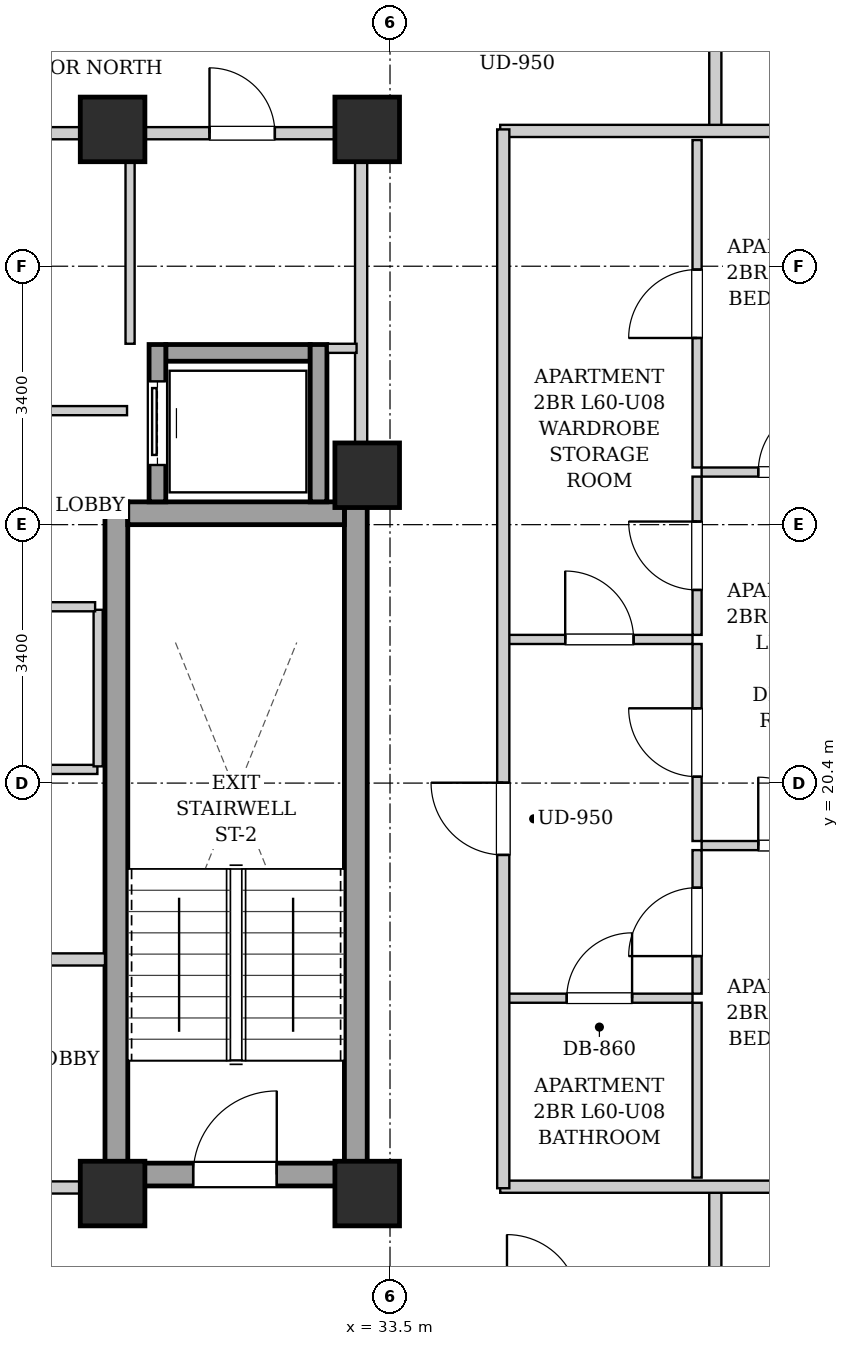
"""IFC4 building model, lengths in metres.
Left out: names, types, materials, properties, quantities, classifications, styles, units other than length and angle.
Written with IfcOpenShell. Run it as: python <this file> out.ifc"""

import sys

from ifc_helpers import new_model, si_unit, direction, frame, frame_2d, origin, origin_2d, place, context, subcontext, project, spatial, rectangle, extrude, element, fill, save


model = new_model("IFC4")
c1 = context("Model", 3, precision=1e-05, world=origin(), true_north=direction((0.0, 1.0)))
c2 = subcontext(c1, "Body", "Model", "MODEL_VIEW")
j1 = project(units=[si_unit("LENGTHUNIT", "METRE"), si_unit("PLANEANGLEUNIT", "RADIAN")], contexts=[c1])
p1 = place(None, origin())
s1 = spatial("IfcSite", under=j1, at=p1, CompositionType="ELEMENT")
p2 = place(p1, origin())
s2 = spatial("IfcBuilding", under=s1, at=p2, CompositionType="ELEMENT")
p3 = place(p2, frame((0.0, 0.0, 207.4)))
s3 = spatial("IfcBuildingStorey", under=s2, at=p3, CompositionType="ELEMENT", Elevation=207.4)
for number, where, z_axis, x_axis in (
    (1, (29.85, 15.0, 0.0), (0.0, 0.0, 1.0), (1.0, 0.0, 0.0)),
    (2, (33.2, 15.0, 0.0), (0.0, 0.0, 1.0), (1.0, 0.0, 0.0)),
    (3, (29.85, 29.0, 0.0), (0.0, 0.0, 1.0), (1.0, 0.0, 0.0)),
    (4, (33.2, 29.0, 0.0), (0.0, 0.0, 1.0), (1.0, 0.0, 0.0)),
    (5, (33.2, 24.45, 0.0), (0.0, 0.0, 1.0), (1.0, 0.0, 0.0)),
):
    element("IfcColumn", number, at=place(p3, frame(where, z_axis=z_axis, x_axis=x_axis)), inside=s3, PredefinedType="COLUMN", context=c2, shape_type="SweptSolid", body=[
        extrude(rectangle(XDim=0.85, YDim=0.85, at=origin_2d()), origin(), (0.0, 0.0, 1.0), 3.3),
    ])
for number, where, z_axis, x_axis in (
    (6, (29.9, 15.1, 0.0), (0.0, 0.0, 1.0), (0.0, 1.0, 0.0)),
    (7, (33.05, 15.1, 0.0), (0.0, 0.0, 1.0), (0.0, 1.0, 0.0)),
):
    element("IfcWall", number, at=place(p3, frame(where, z_axis=z_axis, x_axis=x_axis)), inside=s3, PredefinedType="SHEAR", context=c2, shape_type="SweptSolid", body=[
        extrude(rectangle(XDim=9.0, YDim=0.3, at=frame_2d((4.5, 0.0))), origin(), (0.0, 0.0, 1.0), 3.04),
    ])
p4 = place(p3, frame((30.05, 23.95, 0.0), z_axis=(0.0, 0.0, 1.0), x_axis=(1.0, 0.0, 0.0)))
e8 = element("IfcWall", 8, at=p4, inside=s3, PredefinedType="SHEAR", context=c2, shape_type="SweptSolid", body=[
    extrude(rectangle(XDim=2.85, YDim=0.3, at=frame_2d((1.425, 0.0))), origin(), (0.0, 0.0, 1.0), 3.04),
])
p5 = place(p3, frame((30.05, 15.25, 0.0), z_axis=(0.0, 0.0, 1.0), x_axis=(1.0, 0.0, 0.0)))
e9 = element("IfcWall", 9, at=p5, inside=s3, PredefinedType="SHEAR", context=c2, shape_type="SweptSolid", body=[
    extrude(rectangle(XDim=2.85, YDim=0.3, at=frame_2d((1.425, 0.0))), origin(), (0.0, 0.0, 1.0), 3.04),
])
p6 = place(p5, frame((0.86, 0.0, 0.0)))
e10 = element("IfcOpeningElement", 10, at=p6, cuts=e9, PredefinedType="OPENING", context=c2, shape_type="SweptSolid", body=[
    extrude(rectangle(XDim=1.1, YDim=2.05, at=frame_2d((0.55, 1.025))), frame((0.0, 0.16, 0.0), z_axis=(0.0, -1.0, 0.0), x_axis=(1.0, 0.0, 0.0)), (0.0, 0.0, 1.0), 0.32),
])
p7 = place(p3, frame((30.55, 26.06, 0.0), z_axis=(0.0, 0.0, 1.0), x_axis=(1.0, 0.0, 0.0)))
e11 = element("IfcWall", 11, at=p7, inside=s3, PredefinedType="SHEAR", context=c2, shape_type="SweptSolid", body=[
    extrude(rectangle(XDim=1.9, YDim=0.22, at=frame_2d((0.95, 0.0))), origin(), (0.0, 0.0, 1.0), 3.04),
])
p8 = place(p3, frame((30.44, 24.1, 0.0), z_axis=(0.0, 0.0, 1.0), x_axis=(0.0, 1.0, 0.0)))
e12 = element("IfcWall", 12, at=p8, inside=s3, PredefinedType="SHEAR", context=c2, shape_type="SweptSolid", body=[
    extrude(rectangle(XDim=2.07, YDim=0.22, at=frame_2d((1.035, 0.0))), origin(), (0.0, 0.0, 1.0), 3.04),
])
p9 = place(p8, frame((0.485, 0.0, 0.0)))
e13 = element("IfcOpeningElement", 13, at=p9, cuts=e12, PredefinedType="OPENING", context=c2, shape_type="SweptSolid", body=[
    extrude(rectangle(XDim=1.1, YDim=2.15, at=frame_2d((0.55, 1.075))), frame((0.0, 0.12, 0.0), z_axis=(0.0, -1.0, 0.0), x_axis=(1.0, 0.0, 0.0)), (0.0, 0.0, 1.0), 0.24),
])
p10 = place(p3, frame((32.56, 24.1, 0.0), z_axis=(0.0, 0.0, 1.0), x_axis=(0.0, 1.0, 0.0)))
e14 = element("IfcWall", 14, at=p10, inside=s3, PredefinedType="SHEAR", context=c2, shape_type="SweptSolid", body=[
    extrude(rectangle(XDim=2.07, YDim=0.22, at=frame_2d((1.035, 0.0))), origin(), (0.0, 0.0, 1.0), 3.04),
])
p11 = place(p3, frame((21.25, 15.08, 0.0), z_axis=(0.0, 0.0, 1.0), x_axis=(1.0, 0.0, 0.0)))
e15 = element("IfcWall", 15, at=p11, inside=s3, PredefinedType="PARTITIONING", context=c2, shape_type="SweptSolid", body=[
    extrude(rectangle(XDim=8.5, YDim=0.16, at=frame_2d((4.25, 0.0))), origin(), (0.0, 0.0, 1.0), 2.556),
])
p12 = place(p11, frame((3.725, 0.0, 0.0)))
e16 = element("IfcOpeningElement", 16, at=p12, cuts=e15, PredefinedType="OPENING", context=c2, shape_type="SweptSolid", body=[
    extrude(rectangle(XDim=1.05, YDim=2.05, at=frame_2d((0.525, 1.025))), frame((0.0, 0.09, 0.0), z_axis=(0.0, -1.0, 0.0), x_axis=(1.0, 0.0, 0.0)), (0.0, 0.0, 1.0), 0.18),
])
p13 = place(p3, frame((28.65, 18.08, 0.0), z_axis=(0.0, 0.0, 1.0), x_axis=(1.0, 0.0, 0.0)))
e17 = element("IfcWall", 17, at=p13, inside=s3, PredefinedType="PARTITIONING", context=c2, shape_type="SweptSolid", body=[
    extrude(rectangle(XDim=1.1, YDim=0.16, at=frame_2d((0.55, 0.0))), origin(), (0.0, 0.0, 1.0), 3.04),
])
p14 = place(p3, frame((33.12, 24.12, 0.0), z_axis=(0.0, 0.0, 1.0), x_axis=(0.0, 1.0, 0.0)))
e18 = element("IfcWall", 18, at=p14, inside=s3, PredefinedType="PARTITIONING", context=c2, shape_type="SweptSolid", body=[
    extrude(rectangle(XDim=4.76, YDim=0.16, at=frame_2d((2.38, 0.0))), origin(), (0.0, 0.0, 1.0), 2.375),
])
p15 = place(p3, frame((30.08, 26.18, 0.0), z_axis=(0.0, 0.0, 1.0), x_axis=(0.0, 1.0, 0.0)))
e19 = element("IfcWall", 19, at=p15, inside=s3, PredefinedType="PARTITIONING", context=c2, shape_type="SweptSolid", body=[
    extrude(rectangle(XDim=2.68, YDim=0.12, at=frame_2d((1.34, 0.0))), origin(), (0.0, 0.0, 1.0), 3.04),
])
p16 = place(p3, frame((32.68, 26.12, 0.0), z_axis=(0.0, 0.0, 1.0), x_axis=(1.0, 0.0, 0.0)))
e20 = element("IfcWall", 20, at=p16, inside=s3, PredefinedType="PARTITIONING", context=c2, shape_type="SweptSolid", body=[
    extrude(rectangle(XDim=0.38, YDim=0.12, at=frame_2d((0.19, 0.0))), origin(), (0.0, 0.0, 1.0), 3.04),
])
p17 = place(p3, frame((30.08, 28.95, 0.0), z_axis=(0.0, 0.0, 1.0), x_axis=(1.0, 0.0, 0.0)))
e21 = element("IfcWall", 21, at=p17, inside=s3, PredefinedType="PARTITIONING", context=c2, shape_type="SweptSolid", body=[
    extrude(rectangle(XDim=2.96, YDim=0.16, at=frame_2d((1.48, 0.0))), origin(), (0.0, 0.0, 1.0), 3.04),
])
p18 = place(p17, frame((1.045, 0.0, 0.0)))
e22 = element("IfcOpeningElement", 22, at=p18, cuts=e21, PredefinedType="OPENING", context=c2, shape_type="SweptSolid", body=[
    extrude(rectangle(XDim=0.86, YDim=2.05, at=frame_2d((0.43, 1.025))), frame((0.0, 0.09, 0.0), z_axis=(0.0, -1.0, 0.0), x_axis=(1.0, 0.0, 0.0)), (0.0, 0.0, 1.0), 0.18),
])
p19 = place(p3, frame((25.72, 28.95, 0.0), z_axis=(0.0, 0.0, 1.0), x_axis=(1.0, 0.0, 0.0)))
e23 = element("IfcWall", 23, at=p19, inside=s3, PredefinedType="PARTITIONING", context=c2, shape_type="SweptSolid", body=[
    extrude(rectangle(XDim=4.32, YDim=0.16, at=frame_2d((2.16, 0.0))), origin(), (0.0, 0.0, 1.0), 2.556),
])
p20 = place(p3, frame((25.72, 25.3, 0.0), z_axis=(0.0, 0.0, 1.0), x_axis=(1.0, 0.0, 0.0)))
e24 = element("IfcWall", 24, at=p20, inside=s3, PredefinedType="PARTITIONING", context=c2, shape_type="SweptSolid", body=[
    extrude(rectangle(XDim=4.32, YDim=0.12, at=frame_2d((2.16, 0.0))), origin(), (0.0, 0.0, 1.0), 3.04),
])
p21 = place(p20, frame((1.65, 0.0, 0.0)))
e25 = element("IfcOpeningElement", 25, at=p21, cuts=e24, PredefinedType="OPENING", context=c2, shape_type="SweptSolid", body=[
    extrude(rectangle(XDim=0.9, YDim=2.05, at=frame_2d((0.45, 1.025))), frame((0.0, 0.07, 0.0), z_axis=(0.0, -1.0, 0.0), x_axis=(1.0, 0.0, 0.0)), (0.0, 0.0, 1.0), 0.14),
])
p22 = place(p3, frame((22.3, 20.58, 0.0), z_axis=(0.0, 0.0, 1.0), x_axis=(1.0, 0.0, 0.0)))
e26 = element("IfcWall", 26, at=p22, inside=s3, PredefinedType="PARTITIONING", context=c2, shape_type="SweptSolid", body=[
    extrude(rectangle(XDim=7.35, YDim=0.12, at=frame_2d((3.675, 0.0))), origin(), (0.0, 0.0, 1.0), 3.04),
])
p23 = place(p3, frame((29.66, 20.62, 0.0), z_axis=(0.0, 0.0, 1.0), x_axis=(0.0, 1.0, 0.0)))
e27 = element("IfcWall", 27, at=p23, inside=s3, PredefinedType="PARTITIONING", context=c2, shape_type="SweptSolid", body=[
    extrude(rectangle(XDim=2.06, YDim=0.12, at=frame_2d((1.03, 0.0))), origin(), (0.0, 0.0, 1.0), 3.04),
])
p24 = place(p3, frame((22.35, 22.72, 0.0), z_axis=(0.0, 0.0, 1.0), x_axis=(1.0, 0.0, 0.0)))
e28 = element("IfcWall", 28, at=p24, inside=s3, PredefinedType="PARTITIONING", context=c2, shape_type="SweptSolid", body=[
    extrude(rectangle(XDim=7.27, YDim=0.12, at=frame_2d((3.635, 0.0))), origin(), (0.0, 0.0, 1.0), 3.04),
])
p25 = place(p24, frame((3.25, 0.0, 0.0)))
e29 = element("IfcOpeningElement", 29, at=p25, cuts=e28, PredefinedType="OPENING", context=c2, shape_type="SweptSolid", body=[
    extrude(rectangle(XDim=0.9, YDim=2.05, at=frame_2d((0.45, 1.025))), frame((0.0, 0.07, 0.0), z_axis=(0.0, -1.0, 0.0), x_axis=(1.0, 0.0, 0.0)), (0.0, 0.0, 1.0), 0.14),
])
for number, where, z_axis, x_axis in (
    (30, (37.78, 13.51, 0.0), (0.0, 0.0, 1.0), (0.0, 1.0, 0.0)),
    (31, (37.78, 28.98, 0.0), (0.0, 0.0, 1.0), (0.0, 1.0, 0.0)),
):
    element("IfcWall", number, at=place(p3, frame(where, z_axis=z_axis, x_axis=x_axis)), inside=s3, PredefinedType="PARTITIONING", context=c2, shape_type="SweptSolid", body=[
        extrude(rectangle(XDim=1.58, YDim=0.16, at=frame_2d((0.79, 0.0))), origin(), (0.0, 0.0, 1.0), 3.04),
    ])
for number, where, z_axis, x_axis in (
    (32, (34.95, 15.09, 0.0), (0.0, 0.0, 1.0), (1.0, 0.0, 0.0)),
    (33, (34.95, 28.98, 0.0), (0.0, 0.0, 1.0), (1.0, 0.0, 0.0)),
):
    element("IfcWall", number, at=place(p3, frame(where, z_axis=z_axis, x_axis=x_axis)), inside=s3, PredefinedType="PARTITIONING", context=c2, shape_type="SweptSolid", body=[
        extrude(rectangle(XDim=5.07, YDim=0.16, at=frame_2d((2.535, 0.0))), origin(), (0.0, 0.0, 1.0), 2.556),
    ])
p26 = place(p3, frame((35.03, 22.29, 0.0), z_axis=(0.0, 0.0, 1.0), x_axis=(1.0, 0.0, 0.0)))
e34 = element("IfcWall", 34, at=p26, inside=s3, PredefinedType="PARTITIONING", context=c2, shape_type="SweptSolid", body=[
    extrude(rectangle(XDim=2.45, YDim=0.12, at=frame_2d((1.225, 0.0))), origin(), (0.0, 0.0, 1.0), 3.04),
])
p27 = place(p26, frame((0.775, 0.0, 0.0)))
e35 = element("IfcOpeningElement", 35, at=p27, cuts=e34, PredefinedType="OPENING", context=c2, shape_type="SweptSolid", body=[
    extrude(rectangle(XDim=0.9, YDim=2.05, at=frame_2d((0.45, 1.025))), frame((0.0, 0.07, 0.0), z_axis=(0.0, -1.0, 0.0), x_axis=(1.0, 0.0, 0.0)), (0.0, 0.0, 1.0), 0.14),
])
p28 = place(p3, frame((37.54, 22.35, 0.0), z_axis=(0.0, 0.0, 1.0), x_axis=(0.0, 1.0, 0.0)))
e36 = element("IfcWall", 36, at=p28, inside=s3, PredefinedType="PARTITIONING", context=c2, shape_type="SweptSolid", body=[
    extrude(rectangle(XDim=2.082, YDim=0.12, at=frame_2d((1.041, 0.0))), origin(), (0.0, 0.0, 1.0), 3.04),
])
p29 = place(p28, frame((0.591, 0.0, 0.0)))
e37 = element("IfcOpeningElement", 37, at=p29, cuts=e36, PredefinedType="OPENING", context=c2, shape_type="SweptSolid", body=[
    extrude(rectangle(XDim=0.9, YDim=2.05, at=frame_2d((0.45, 1.025))), frame((0.0, 0.07, 0.0), z_axis=(0.0, -1.0, 0.0), x_axis=(1.0, 0.0, 0.0)), (0.0, 0.0, 1.0), 0.14),
])
p30 = place(p3, frame((37.54, 24.552, 0.0), z_axis=(0.0, 0.0, 1.0), x_axis=(0.0, 1.0, 0.0)))
e38 = element("IfcWall", 38, at=p30, inside=s3, PredefinedType="PARTITIONING", context=c2, shape_type="SweptSolid", body=[
    extrude(rectangle(XDim=4.308, YDim=0.12, at=frame_2d((2.154, 0.0))), origin(), (0.0, 0.0, 1.0), 3.04),
])
p31 = place(p30, frame((1.704, 0.0, 0.0)))
e39 = element("IfcOpeningElement", 39, at=p31, cuts=e38, PredefinedType="OPENING", context=c2, shape_type="SweptSolid", body=[
    extrude(rectangle(XDim=0.9, YDim=2.05, at=frame_2d((0.45, 1.025))), frame((0.0, 0.07, 0.0), z_axis=(0.0, -1.0, 0.0), x_axis=(1.0, 0.0, 0.0)), (0.0, 0.0, 1.0), 0.14),
])
p32 = place(p3, frame((35.03, 17.57, 0.0), z_axis=(0.0, 0.0, 1.0), x_axis=(1.0, 0.0, 0.0)))
e40 = element("IfcWall", 40, at=p32, inside=s3, PredefinedType="PARTITIONING", context=c2, shape_type="SweptSolid", body=[
    extrude(rectangle(XDim=2.45, YDim=0.12, at=frame_2d((1.225, 0.0))), origin(), (0.0, 0.0, 1.0), 3.04),
])
p33 = place(p32, frame((0.795, 0.0, 0.0)))
e41 = element("IfcOpeningElement", 41, at=p33, cuts=e40, PredefinedType="OPENING", context=c2, shape_type="SweptSolid", body=[
    extrude(rectangle(XDim=0.86, YDim=2.05, at=frame_2d((0.43, 1.025))), frame((0.0, 0.07, 0.0), z_axis=(0.0, -1.0, 0.0), x_axis=(1.0, 0.0, 0.0)), (0.0, 0.0, 1.0), 0.14),
])
p34 = place(p3, frame((37.54, 15.21, 0.0), z_axis=(0.0, 0.0, 1.0), x_axis=(0.0, 1.0, 0.0)))
e42 = element("IfcWall", 42, at=p34, inside=s3, PredefinedType="PARTITIONING", context=c2, shape_type="SweptSolid", body=[
    extrude(rectangle(XDim=2.3, YDim=0.12, at=frame_2d((1.15, 0.0))), origin(), (0.0, 0.0, 1.0), 3.04),
])
p35 = place(p3, frame((37.54, 17.63, 0.0), z_axis=(0.0, 0.0, 1.0), x_axis=(0.0, 1.0, 0.0)))
e43 = element("IfcWall", 43, at=p35, inside=s3, PredefinedType="PARTITIONING", context=c2, shape_type="SweptSolid", body=[
    extrude(rectangle(XDim=1.888, YDim=0.12, at=frame_2d((0.944, 0.0))), origin(), (0.0, 0.0, 1.0), 3.04),
])
p36 = place(p35, frame((0.494, 0.0, 0.0)))
e44 = element("IfcOpeningElement", 44, at=p36, cuts=e43, PredefinedType="OPENING", context=c2, shape_type="SweptSolid", body=[
    extrude(rectangle(XDim=0.9, YDim=2.05, at=frame_2d((0.45, 1.025))), frame((0.0, 0.07, 0.0), z_axis=(0.0, -1.0, 0.0), x_axis=(1.0, 0.0, 0.0)), (0.0, 0.0, 1.0), 0.14),
])
p37 = place(p3, frame((37.54, 19.638, 0.0), z_axis=(0.0, 0.0, 1.0), x_axis=(0.0, 1.0, 0.0)))
e45 = element("IfcWall", 45, at=p37, inside=s3, PredefinedType="PARTITIONING", context=c2, shape_type="SweptSolid", body=[
    extrude(rectangle(XDim=2.592, YDim=0.12, at=frame_2d((1.296, 0.0))), origin(), (0.0, 0.0, 1.0), 3.04),
])
p38 = place(p37, frame((0.846, 0.0, 0.0)))
e46 = element("IfcOpeningElement", 46, at=p38, cuts=e45, PredefinedType="OPENING", context=c2, shape_type="SweptSolid", body=[
    extrude(rectangle(XDim=0.9, YDim=2.05, at=frame_2d((0.45, 1.025))), frame((0.0, 0.07, 0.0), z_axis=(0.0, -1.0, 0.0), x_axis=(1.0, 0.0, 0.0)), (0.0, 0.0, 1.0), 0.14),
])
p39 = place(p3, frame((37.6, 19.578, 0.0), z_axis=(0.0, 0.0, 1.0), x_axis=(1.0, 0.0, 0.0)))
e47 = element("IfcWall", 47, at=p39, inside=s3, PredefinedType="PARTITIONING", context=c2, shape_type="SweptSolid", body=[
    extrude(rectangle(XDim=2.42, YDim=0.12, at=frame_2d((1.21, 0.0))), origin(), (0.0, 0.0, 1.0), 3.04),
])
p40 = place(p39, frame((0.745, 0.0, 0.0)))
e48 = element("IfcOpeningElement", 48, at=p40, cuts=e47, PredefinedType="OPENING", context=c2, shape_type="SweptSolid", body=[
    extrude(rectangle(XDim=0.9, YDim=2.05, at=frame_2d((0.45, 1.025))), frame((0.0, 0.07, 0.0), z_axis=(0.0, -1.0, 0.0), x_axis=(1.0, 0.0, 0.0)), (0.0, 0.0, 1.0), 0.14),
])
p41 = place(p3, frame((37.6, 24.492, 0.0), z_axis=(0.0, 0.0, 1.0), x_axis=(1.0, 0.0, 0.0)))
e49 = element("IfcWall", 49, at=p41, inside=s3, PredefinedType="PARTITIONING", context=c2, shape_type="SweptSolid", body=[
    extrude(rectangle(XDim=2.42, YDim=0.12, at=frame_2d((1.21, 0.0))), origin(), (0.0, 0.0, 1.0), 2.722),
])
p42 = place(p41, frame((0.745, 0.0, 0.0)))
e50 = element("IfcOpeningElement", 50, at=p42, cuts=e49, PredefinedType="OPENING", context=c2, shape_type="SweptSolid", body=[
    extrude(rectangle(XDim=0.9, YDim=2.05, at=frame_2d((0.45, 1.025))), frame((0.0, 0.07, 0.0), z_axis=(0.0, -1.0, 0.0), x_axis=(1.0, 0.0, 0.0)), (0.0, 0.0, 1.0), 0.14),
])
p43 = place(p3, frame((34.99, 15.07, 0.0), z_axis=(0.0, 0.0, 1.0), x_axis=(0.0, 1.0, 0.0)))
e51 = element("IfcWall", 51, at=p43, inside=s3, PredefinedType="PARTITIONING", context=c2, shape_type="SweptSolid", body=[
    extrude(rectangle(XDim=13.93, YDim=0.16, at=frame_2d((6.965, 0.0))), origin(), (0.0, 0.0, 1.0), 3.04),
])
p44 = place(p43, frame((4.385, 0.0, 0.0)))
e52 = element("IfcOpeningElement", 52, at=p44, cuts=e51, PredefinedType="OPENING", context=c2, shape_type="SweptSolid", body=[
    extrude(rectangle(XDim=0.95, YDim=2.1, at=frame_2d((0.475, 1.05))), frame((0.0, 0.09, 0.0), z_axis=(0.0, -1.0, 0.0), x_axis=(1.0, 0.0, 0.0)), (0.0, 0.0, 1.0), 0.18),
])
p45 = place(p6, origin())
e53 = element("IfcDoor", 53, at=p45, inside=s3, OperationType="SINGLE_SWING_RIGHT", PredefinedType="DOOR", context=c2, shape_type="SweptSolid", body=[
    extrude(rectangle(XDim=1.1, YDim=2.05, at=frame_2d((0.55, 1.025))), frame((0.0, 0.025, 0.0), z_axis=(0.0, -1.0, 0.0), x_axis=(1.0, 0.0, 0.0)), (0.0, 0.0, 1.0), 0.05),
])
fill(e10, e53)
p46 = place(p9, origin())
e54 = element("IfcDoor", 54, at=p46, inside=s3, OperationType="SLIDING_TO_LEFT", PredefinedType="DOOR", context=c2, shape_type="SweptSolid", body=[
    extrude(rectangle(XDim=1.1, YDim=2.15, at=frame_2d((0.55, 1.075))), frame((0.0, 0.025, 0.0), z_axis=(0.0, -1.0, 0.0), x_axis=(1.0, 0.0, 0.0)), (0.0, 0.0, 1.0), 0.05),
])
fill(e13, e54)
p47 = place(p18, origin())
e55 = element("IfcDoor", 55, at=p47, inside=s3, OperationType="SINGLE_SWING_LEFT", PredefinedType="DOOR", context=c2, shape_type="SweptSolid", body=[
    extrude(rectangle(XDim=0.86, YDim=2.05, at=frame_2d((0.43, 1.025))), frame((0.0, 0.025, 0.0), z_axis=(0.0, -1.0, 0.0), x_axis=(1.0, 0.0, 0.0)), (0.0, 0.0, 1.0), 0.05),
])
fill(e22, e55)
p48 = place(p27, origin())
e56 = element("IfcDoor", 56, at=p48, inside=s3, OperationType="SINGLE_SWING_LEFT", PredefinedType="DOOR", context=c2, shape_type="SweptSolid", body=[
    extrude(rectangle(XDim=0.9, YDim=2.05, at=frame_2d((0.45, 1.025))), frame((0.0, 0.025, 0.0), z_axis=(0.0, -1.0, 0.0), x_axis=(1.0, 0.0, 0.0)), (0.0, 0.0, 1.0), 0.05),
])
fill(e35, e56)
p49 = place(p29, origin())
e57 = element("IfcDoor", 57, at=p49, inside=s3, OperationType="SINGLE_SWING_RIGHT", PredefinedType="DOOR", context=c2, shape_type="SweptSolid", body=[
    extrude(rectangle(XDim=0.9, YDim=2.05, at=frame_2d((0.45, 1.025))), frame((0.0, 0.025, 0.0), z_axis=(0.0, -1.0, 0.0), x_axis=(1.0, 0.0, 0.0)), (0.0, 0.0, 1.0), 0.05),
])
fill(e37, e57)
p50 = place(p31, origin())
e58 = element("IfcDoor", 58, at=p50, inside=s3, OperationType="SINGLE_SWING_LEFT", PredefinedType="DOOR", context=c2, shape_type="SweptSolid", body=[
    extrude(rectangle(XDim=0.9, YDim=2.05, at=frame_2d((0.45, 1.025))), frame((0.0, 0.025, 0.0), z_axis=(0.0, -1.0, 0.0), x_axis=(1.0, 0.0, 0.0)), (0.0, 0.0, 1.0), 0.05),
])
fill(e39, e58)
p51 = place(p33, origin())
e59 = element("IfcDoor", 59, at=p51, inside=s3, OperationType="SINGLE_SWING_RIGHT", PredefinedType="DOOR", context=c2, shape_type="SweptSolid", body=[
    extrude(rectangle(XDim=0.86, YDim=2.05, at=frame_2d((0.43, 1.025))), frame((0.0, 0.025, 0.0), z_axis=(0.0, -1.0, 0.0), x_axis=(1.0, 0.0, 0.0)), (0.0, 0.0, 1.0), 0.05),
])
fill(e41, e59)
p52 = place(p36, origin())
e60 = element("IfcDoor", 60, at=p52, inside=s3, OperationType="SINGLE_SWING_LEFT", PredefinedType="DOOR", context=c2, shape_type="SweptSolid", body=[
    extrude(rectangle(XDim=0.9, YDim=2.05, at=frame_2d((0.45, 1.025))), frame((0.0, 0.025, 0.0), z_axis=(0.0, -1.0, 0.0), x_axis=(1.0, 0.0, 0.0)), (0.0, 0.0, 1.0), 0.05),
])
fill(e44, e60)
p53 = place(p38, origin())
e61 = element("IfcDoor", 61, at=p53, inside=s3, OperationType="SINGLE_SWING_RIGHT", PredefinedType="DOOR", context=c2, shape_type="SweptSolid", body=[
    extrude(rectangle(XDim=0.9, YDim=2.05, at=frame_2d((0.45, 1.025))), frame((0.0, 0.025, 0.0), z_axis=(0.0, -1.0, 0.0), x_axis=(1.0, 0.0, 0.0)), (0.0, 0.0, 1.0), 0.05),
])
fill(e46, e61)
p54 = place(p40, origin())
e62 = element("IfcDoor", 62, at=p54, inside=s3, OperationType="SINGLE_SWING_LEFT", PredefinedType="DOOR", context=c2, shape_type="SweptSolid", body=[
    extrude(rectangle(XDim=0.9, YDim=2.05, at=frame_2d((0.45, 1.025))), frame((0.0, 0.025, 0.0), z_axis=(0.0, -1.0, 0.0), x_axis=(1.0, 0.0, 0.0)), (0.0, 0.0, 1.0), 0.05),
])
fill(e48, e62)
p55 = place(p42, origin())
e63 = element("IfcDoor", 63, at=p55, inside=s3, OperationType="SINGLE_SWING_RIGHT", PredefinedType="DOOR", context=c2, shape_type="SweptSolid", body=[
    extrude(rectangle(XDim=0.9, YDim=2.05, at=frame_2d((0.45, 1.025))), frame((0.0, 0.025, 0.0), z_axis=(0.0, -1.0, 0.0), x_axis=(1.0, 0.0, 0.0)), (0.0, 0.0, 1.0), 0.05),
])
fill(e50, e63)
p56 = place(p44, origin())
e64 = element("IfcDoor", 64, at=p56, inside=s3, OperationType="SINGLE_SWING_RIGHT", PredefinedType="DOOR", context=c2, shape_type="SweptSolid", body=[
    extrude(rectangle(XDim=0.95, YDim=2.1, at=frame_2d((0.475, 1.05))), frame((0.0, 0.025, 0.0), z_axis=(0.0, -1.0, 0.0), x_axis=(1.0, 0.0, 0.0)), (0.0, 0.0, 1.0), 0.05),
])
fill(e52, e64)
save(model, sys.argv[1])
